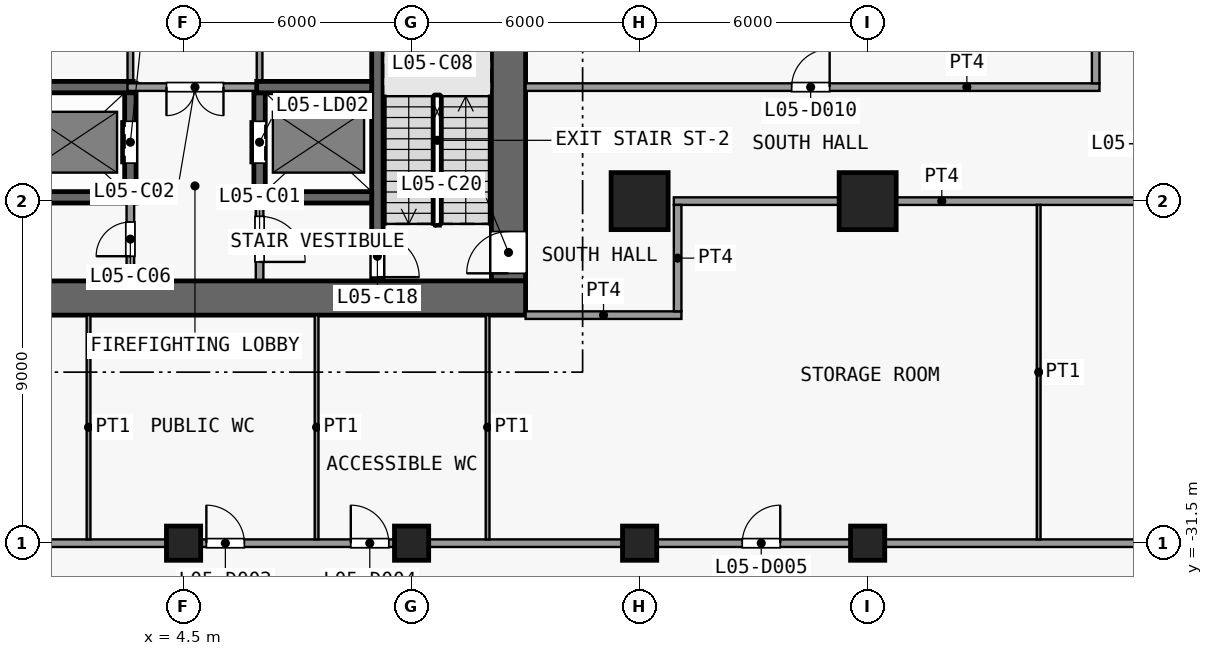
"""IFC4 building model, lengths in metres.
Left out: names, types, materials, properties, quantities, classifications, styles, units other than length and angle.
Written with IfcOpenShell. Run it as: python <this file> out.ifc"""

import sys

from ifc_helpers import new_model, si_unit, direction, frame, frame_2d, origin, origin_2d, place, context, subcontext, project, spatial, rectangle, extrude, element, fill, save


model = new_model("IFC4")
c1 = context("Model", 3, precision=1e-05, world=origin(), true_north=direction((0.0, 1.0)))
c2 = subcontext(c1, "Body", "Model", "MODEL_VIEW")
j1 = project(units=[si_unit("LENGTHUNIT", "METRE"), si_unit("PLANEANGLEUNIT", "RADIAN")], contexts=[c1])
p1 = place(None, origin())
s1 = spatial("IfcSite", under=j1, at=p1, CompositionType="ELEMENT")
p2 = place(p1, origin())
s2 = spatial("IfcBuilding", under=s1, at=p2, CompositionType="ELEMENT")
p3 = place(p2, frame((0.0, 0.0, 28.0)))
s3 = spatial("IfcBuildingStorey", under=s2, at=p3, CompositionType="ELEMENT", Elevation=28.0)
for number, where, z_axis, x_axis in (
    (1, (4.5, -31.5, 0.0), (0.0, 0.0, 1.0), (1.0, 0.0, 0.0)),
    (2, (10.5, -31.5, 0.0), (0.0, 0.0, 1.0), (1.0, 0.0, 0.0)),
    (3, (16.5, -31.5, 0.0), (0.0, 0.0, 1.0), (1.0, 0.0, 0.0)),
):
    element("IfcColumn", number, at=place(p3, frame(where, z_axis=z_axis, x_axis=x_axis)), inside=s3, PredefinedType="COLUMN", context=c2, shape_type="SweptSolid", body=[
        extrude(rectangle(XDim=0.9, YDim=0.9, at=origin_2d()), origin(), (0.0, 0.0, 1.0), 4.5),
    ])
p4 = place(p3, frame((16.5, -22.5, 0.0), z_axis=(0.0, 0.0, 1.0), x_axis=(1.0, 0.0, 0.0)))
e4 = element("IfcColumn", 4, at=p4, inside=s3, PredefinedType="COLUMN", context=c2, shape_type="SweptSolid", body=[
    extrude(rectangle(XDim=1.5, YDim=1.5, at=origin_2d()), origin(), (0.0, 0.0, 1.0), 4.5),
])
p5 = place(p3, frame((22.5, -31.5, 0.0), z_axis=(0.0, 0.0, 1.0), x_axis=(1.0, 0.0, 0.0)))
e5 = element("IfcColumn", 5, at=p5, inside=s3, PredefinedType="COLUMN", context=c2, shape_type="SweptSolid", body=[
    extrude(rectangle(XDim=0.9, YDim=0.9, at=origin_2d()), origin(), (0.0, 0.0, 1.0), 4.5),
])
p6 = place(p3, frame((22.5, -22.5, 0.0), z_axis=(0.0, 0.0, 1.0), x_axis=(1.0, 0.0, 0.0)))
e6 = element("IfcColumn", 6, at=p6, inside=s3, PredefinedType="COLUMN", context=c2, shape_type="SweptSolid", body=[
    extrude(rectangle(XDim=1.5, YDim=1.5, at=origin_2d()), origin(), (0.0, 0.0, 1.0), 4.5),
])
p7 = place(p3, frame((-13.5, -25.05, 0.0), z_axis=(0.0, 0.0, 1.0), x_axis=(1.0, 0.0, 0.0)))
e7 = element("IfcWall", 7, at=p7, inside=s3, PredefinedType="SHEAR", context=c2, shape_type="SweptSolid", body=[
    extrude(rectangle(XDim=27.0, YDim=0.9, at=frame_2d((13.5, 0.0))), origin(), (0.0, 0.0, 1.0), 4.1),
])
p8 = place(p3, frame((13.05, -24.6, 0.0), z_axis=(0.0, 0.0, 1.0), x_axis=(0.0, 1.0, 0.0)))
e8 = element("IfcWall", 8, at=p8, inside=s3, PredefinedType="SHEAR", context=c2, shape_type="SweptSolid", body=[
    extrude(rectangle(XDim=16.1, YDim=0.9, at=frame_2d((8.05, 0.0))), origin(), (0.0, 0.0, 1.0), 4.1),
])
p9 = place(p8, frame((0.2, 0.0, 0.0)))
e9 = element("IfcOpeningElement", 9, at=p9, cuts=e8, PredefinedType="OPENING", context=c2, shape_type="SweptSolid", body=[
    extrude(rectangle(XDim=1.1, YDim=2.1, at=frame_2d((0.55, 1.05))), frame((0.0, 0.46, 0.0), z_axis=(0.0, -1.0, 0.0), x_axis=(1.0, 0.0, 0.0)), (0.0, 0.0, 1.0), 0.92),
])
p10 = place(p3, frame((-2.95, -22.4, 0.0), z_axis=(0.0, 0.0, 1.0), x_axis=(1.0, 0.0, 0.0)))
e10 = element("IfcWall", 10, at=p10, inside=s3, PredefinedType="SHEAR", context=c2, shape_type="SweptSolid", body=[
    extrude(rectangle(XDim=6.2, YDim=0.3, at=frame_2d((3.1, 0.0))), origin(), (0.0, 0.0, 1.0), 4.1),
])
p11 = place(p3, frame((6.35, -22.4, 0.0), z_axis=(0.0, 0.0, 1.0), x_axis=(1.0, 0.0, 0.0)))
e11 = element("IfcWall", 11, at=p11, inside=s3, PredefinedType="SHEAR", context=c2, shape_type="SweptSolid", body=[
    extrude(rectangle(XDim=3.1, YDim=0.3, at=frame_2d((1.55, 0.0))), origin(), (0.0, 0.0, 1.0), 4.1),
])
p12 = place(p3, frame((0.15, -19.5, 0.0), z_axis=(0.0, 0.0, 1.0), x_axis=(1.0, 0.0, 0.0)))
e12 = element("IfcWall", 12, at=p12, inside=s3, PredefinedType="SHEAR", context=c2, shape_type="SweptSolid", body=[
    extrude(rectangle(XDim=3.025, YDim=0.3, at=frame_2d((1.513, 0.0))), origin(), (0.0, 0.0, 1.0), 4.1),
])
p13 = place(p3, frame((6.575, -19.5, 0.0), z_axis=(0.0, 0.0, 1.0), x_axis=(-1.0, 0.0, 0.0)))
e13 = element("IfcWall", 13, at=p13, inside=s3, PredefinedType="PARTITIONING", context=c2, shape_type="SweptSolid", body=[
    extrude(rectangle(XDim=3.55, YDim=0.2, at=frame_2d((1.775, 0.0))), origin(), (0.0, 0.0, 1.0), 4.1),
])
p14 = place(p13, frame((1.025, 0.0, 0.0)))
e14 = element("IfcOpeningElement", 14, at=p14, cuts=e13, PredefinedType="OPENING", context=c2, shape_type="SweptSolid", body=[
    extrude(rectangle(XDim=1.5, YDim=2.1, at=frame_2d((0.75, 1.05))), frame((0.0, 0.11, 0.0), z_axis=(0.0, -1.0, 0.0), x_axis=(1.0, 0.0, 0.0)), (0.0, 0.0, 1.0), 0.22),
])
p15 = place(p3, frame((6.425, -19.5, 0.0), z_axis=(0.0, 0.0, 1.0), x_axis=(1.0, 0.0, 0.0)))
e15 = element("IfcWall", 15, at=p15, inside=s3, PredefinedType="SHEAR", context=c2, shape_type="SweptSolid", body=[
    extrude(rectangle(XDim=3.025, YDim=0.3, at=frame_2d((1.512, 0.0))), origin(), (0.0, 0.0, 1.0), 4.1),
])
p16 = place(p3, frame((3.1, -24.6, 0.0), z_axis=(0.0, 0.0, 1.0), x_axis=(0.0, 1.0, 0.0)))
e16 = element("IfcWall", 16, at=p16, inside=s3, PredefinedType="PARTITIONING", context=c2, shape_type="SweptSolid", body=[
    extrude(rectangle(XDim=2.05, YDim=0.2, at=frame_2d((1.025, 0.0))), origin(), (0.0, 0.0, 1.0), 4.1),
])
p17 = place(p16, frame((0.65, 0.0, 0.0)))
e17 = element("IfcOpeningElement", 17, at=p17, cuts=e16, PredefinedType="OPENING", context=c2, shape_type="SweptSolid", body=[
    extrude(rectangle(XDim=0.9, YDim=2.1, at=frame_2d((0.45, 1.05))), frame((0.0, 0.11, 0.0), z_axis=(0.0, -1.0, 0.0), x_axis=(1.0, 0.0, 0.0)), (0.0, 0.0, 1.0), 0.22),
])
p18 = place(p3, frame((3.1, -22.25, 0.0), z_axis=(0.0, 0.0, 1.0), x_axis=(0.0, 1.0, 0.0)))
e18 = element("IfcWall", 18, at=p18, inside=s3, PredefinedType="SHEAR", context=c2, shape_type="SweptSolid", body=[
    extrude(rectangle(XDim=2.85, YDim=0.3, at=frame_2d((1.425, 0.0))), origin(), (0.0, 0.0, 1.0), 4.1),
])
p19 = place(p18, frame((0.75, 0.0, 0.0)))
e19 = element("IfcOpeningElement", 19, at=p19, cuts=e18, PredefinedType="OPENING", context=c2, shape_type="SweptSolid", body=[
    extrude(rectangle(XDim=1.1, YDim=2.1, at=frame_2d((0.55, 1.05))), frame((0.0, 0.16, 0.0), z_axis=(0.0, -1.0, 0.0), x_axis=(1.0, 0.0, 0.0)), (0.0, 0.0, 1.0), 0.32),
])
p20 = place(p3, frame((3.1, -19.4, 0.0), z_axis=(0.0, 0.0, 1.0), x_axis=(0.0, 1.0, 0.0)))
e20 = element("IfcWall", 20, at=p20, inside=s3, PredefinedType="PARTITIONING", context=c2, shape_type="SweptSolid", body=[
    extrude(rectangle(XDim=10.9, YDim=0.15, at=frame_2d((5.45, 0.0))), origin(), (0.0, 0.0, 1.0), 4.1),
])
p21 = place(p20, frame((4.8, 0.0, 0.0)))
e21 = element("IfcOpeningElement", 21, at=p21, cuts=e20, PredefinedType="OPENING", context=c2, shape_type="SweptSolid", body=[
    extrude(rectangle(XDim=1.2, YDim=2.1, at=frame_2d((0.6, 1.05))), frame((0.0, 0.085, 0.0), z_axis=(0.0, -1.0, 0.0), x_axis=(1.0, 0.0, 0.0)), (0.0, 0.0, 1.0), 0.17),
])
p22 = place(p3, frame((6.5, -22.55, 0.0), z_axis=(0.0, 0.0, 1.0), x_axis=(0.0, -1.0, 0.0)))
e22 = element("IfcWall", 22, at=p22, inside=s3, PredefinedType="PARTITIONING", context=c2, shape_type="SweptSolid", body=[
    extrude(rectangle(XDim=2.05, YDim=0.2, at=frame_2d((1.025, 0.0))), origin(), (0.0, 0.0, 1.0), 4.1),
])
p23 = place(p22, frame((0.35, 0.0, 0.0)))
e23 = element("IfcOpeningElement", 23, at=p23, cuts=e22, PredefinedType="OPENING", context=c2, shape_type="SweptSolid", body=[
    extrude(rectangle(XDim=1.2, YDim=2.1, at=frame_2d((0.6, 1.05))), frame((0.0, 0.11, 0.0), z_axis=(0.0, -1.0, 0.0), x_axis=(1.0, 0.0, 0.0)), (0.0, 0.0, 1.0), 0.22),
])
p24 = place(p3, frame((6.5, -22.25, 0.0), z_axis=(0.0, 0.0, 1.0), x_axis=(0.0, 1.0, 0.0)))
e24 = element("IfcWall", 24, at=p24, inside=s3, PredefinedType="SHEAR", context=c2, shape_type="SweptSolid", body=[
    extrude(rectangle(XDim=2.6, YDim=0.3, at=frame_2d((1.3, 0.0))), origin(), (0.0, 0.0, 1.0), 4.1),
])
p25 = place(p24, frame((0.75, 0.0, 0.0)))
e25 = element("IfcOpeningElement", 25, at=p25, cuts=e24, PredefinedType="OPENING", context=c2, shape_type="SweptSolid", body=[
    extrude(rectangle(XDim=1.1, YDim=2.1, at=frame_2d((0.55, 1.05))), frame((0.0, 0.16, 0.0), z_axis=(0.0, -1.0, 0.0), x_axis=(1.0, 0.0, 0.0)), (0.0, 0.0, 1.0), 0.32),
])
p26 = place(p3, frame((6.5, -8.5, 0.0), z_axis=(0.0, 0.0, 1.0), x_axis=(0.0, -1.0, 0.0)))
e26 = element("IfcWall", 26, at=p26, inside=s3, PredefinedType="PARTITIONING", context=c2, shape_type="SweptSolid", body=[
    extrude(rectangle(XDim=10.85, YDim=0.15, at=frame_2d((5.425, 0.0))), origin(), (0.0, 0.0, 1.0), 4.1),
])
p27 = place(p26, frame((6.275, 0.0, 0.0)))
e27 = element("IfcOpeningElement", 27, at=p27, cuts=e26, PredefinedType="OPENING", context=c2, shape_type="SweptSolid", body=[
    extrude(rectangle(XDim=1.2, YDim=2.1, at=frame_2d((0.6, 1.05))), frame((0.0, 0.085, 0.0), z_axis=(0.0, -1.0, 0.0), x_axis=(1.0, 0.0, 0.0)), (0.0, 0.0, 1.0), 0.17),
])
p28 = place(p26, frame((0.925, 0.0, 0.0)))
e28 = element("IfcOpeningElement", 28, at=p28, cuts=e26, PredefinedType="OPENING", context=c2, shape_type="SweptSolid", body=[
    extrude(rectangle(XDim=0.9, YDim=2.1, at=frame_2d((0.45, 1.05))), frame((0.0, 0.085, 0.0), z_axis=(0.0, -1.0, 0.0), x_axis=(1.0, 0.0, 0.0)), (0.0, 0.0, 1.0), 0.17),
])
p29 = place(p3, frame((9.6, -16.9, 0.0), z_axis=(0.0, 0.0, 1.0), x_axis=(0.0, -1.0, 0.0)))
e29 = element("IfcWall", 29, at=p29, inside=s3, PredefinedType="SHEAR", context=c2, shape_type="SweptSolid", body=[
    extrude(rectangle(XDim=7.7, YDim=0.3, at=frame_2d((3.85, 0.0))), origin(), (0.0, 0.0, 1.0), 4.1),
])
p30 = place(p29, frame((6.5, 0.0, 0.0)))
e30 = element("IfcOpeningElement", 30, at=p30, cuts=e29, PredefinedType="OPENING", context=c2, shape_type="SweptSolid", body=[
    extrude(rectangle(XDim=1.1, YDim=2.1, at=frame_2d((0.55, 1.05))), frame((0.0, 0.16, 0.0), z_axis=(0.0, -1.0, 0.0), x_axis=(1.0, 0.0, 0.0)), (0.0, 0.0, 1.0), 0.32),
])
p31 = place(p3, frame((-25.9, -31.5, 0.0), z_axis=(0.0, 0.0, 1.0), x_axis=(1.0, 0.0, 0.0)))
e31 = element("IfcWall", 31, at=p31, inside=s3, PredefinedType="PARTITIONING", context=c2, shape_type="SweptSolid", body=[
    extrude(rectangle(XDim=78.15, YDim=0.2, at=frame_2d((39.075, 0.0))), origin(), (0.0, 0.0, 1.0), 4.1),
])
p32 = place(p31, frame((5.1, 0.0, 0.0)))
e32 = element("IfcOpeningElement", 32, at=p32, cuts=e31, PredefinedType="OPENING", context=c2, shape_type="SweptSolid", body=[
    extrude(rectangle(XDim=1.0, YDim=2.1, at=frame_2d((0.5, 1.05))), frame((0.0, 0.11, 0.0), z_axis=(0.0, -1.0, 0.0), x_axis=(1.0, 0.0, 0.0)), (0.0, 0.0, 1.0), 0.22),
])
p33 = place(p31, frame((22.0, 0.0, 0.0)))
e33 = element("IfcOpeningElement", 33, at=p33, cuts=e31, PredefinedType="OPENING", context=c2, shape_type="SweptSolid", body=[
    extrude(rectangle(XDim=1.0, YDim=2.1, at=frame_2d((0.5, 1.05))), frame((0.0, 0.11, 0.0), z_axis=(0.0, -1.0, 0.0), x_axis=(1.0, 0.0, 0.0)), (0.0, 0.0, 1.0), 0.22),
])
p34 = place(p31, frame((31.0, 0.0, 0.0)))
e34 = element("IfcOpeningElement", 34, at=p34, cuts=e31, PredefinedType="OPENING", context=c2, shape_type="SweptSolid", body=[
    extrude(rectangle(XDim=1.0, YDim=2.1, at=frame_2d((0.5, 1.05))), frame((0.0, 0.11, 0.0), z_axis=(0.0, -1.0, 0.0), x_axis=(1.0, 0.0, 0.0)), (0.0, 0.0, 1.0), 0.22),
])
p35 = place(p31, frame((34.8, 0.0, 0.0)))
e35 = element("IfcOpeningElement", 35, at=p35, cuts=e31, PredefinedType="OPENING", context=c2, shape_type="SweptSolid", body=[
    extrude(rectangle(XDim=1.0, YDim=2.1, at=frame_2d((0.5, 1.05))), frame((0.0, 0.11, 0.0), z_axis=(0.0, -1.0, 0.0), x_axis=(1.0, 0.0, 0.0)), (0.0, 0.0, 1.0), 0.22),
])
p36 = place(p31, frame((45.1, 0.0, 0.0)))
e36 = element("IfcOpeningElement", 36, at=p36, cuts=e31, PredefinedType="OPENING", context=c2, shape_type="SweptSolid", body=[
    extrude(rectangle(XDim=1.0, YDim=2.1, at=frame_2d((0.5, 1.05))), frame((0.0, 0.11, 0.0), z_axis=(0.0, -1.0, 0.0), x_axis=(1.0, 0.0, 0.0)), (0.0, 0.0, 1.0), 0.22),
])
p37 = place(p31, frame((58.0, 0.0, 0.0)))
e37 = element("IfcOpeningElement", 37, at=p37, cuts=e31, PredefinedType="OPENING", context=c2, shape_type="SweptSolid", body=[
    extrude(rectangle(XDim=1.8, YDim=2.1, at=frame_2d((0.9, 1.05))), frame((0.0, 0.11, 0.0), z_axis=(0.0, -1.0, 0.0), x_axis=(1.0, 0.0, 0.0)), (0.0, 0.0, 1.0), 0.22),
])
p38 = place(p31, frame((72.2, 0.0, 0.0)))
e38 = element("IfcOpeningElement", 38, at=p38, cuts=e31, PredefinedType="OPENING", context=c2, shape_type="SweptSolid", body=[
    extrude(rectangle(XDim=1.8, YDim=2.1, at=frame_2d((0.9, 1.05))), frame((0.0, 0.11, 0.0), z_axis=(0.0, -1.0, 0.0), x_axis=(1.0, 0.0, 0.0)), (0.0, 0.0, 1.0), 0.22),
])
p39 = place(p3, frame((13.5, -25.5, 0.0), z_axis=(0.0, 0.0, 1.0), x_axis=(1.0, 0.0, 0.0)))
e39 = element("IfcWall", 39, at=p39, inside=s3, PredefinedType="PARTITIONING", context=c2, shape_type="SweptSolid", body=[
    extrude(rectangle(XDim=4.1, YDim=0.2, at=frame_2d((2.05, 0.0))), origin(), (0.0, 0.0, 1.0), 4.1),
])
p40 = place(p3, frame((17.4, -22.5, 0.0), z_axis=(0.0, 0.0, 1.0), x_axis=(1.0, 0.0, 0.0)))
e40 = element("IfcWall", 40, at=p40, inside=s3, PredefinedType="PARTITIONING", context=c2, shape_type="SweptSolid", body=[
    extrude(rectangle(XDim=14.1, YDim=0.2, at=frame_2d((7.05, 0.0))), origin(), (0.0, 0.0, 1.0), 4.1),
])
p41 = place(p3, frame((13.5, -19.5, 0.0), z_axis=(0.0, 0.0, 1.0), x_axis=(1.0, 0.0, 0.0)))
e41 = element("IfcWall", 41, at=p41, inside=s3, PredefinedType="PARTITIONING", context=c2, shape_type="SweptSolid", body=[
    extrude(rectangle(XDim=15.1, YDim=0.2, at=frame_2d((7.55, 0.0))), origin(), (0.0, 0.0, 1.0), 4.1),
])
p42 = place(p41, frame((7.0, 0.0, 0.0)))
e42 = element("IfcOpeningElement", 42, at=p42, cuts=e41, PredefinedType="OPENING", context=c2, shape_type="SweptSolid", body=[
    extrude(rectangle(XDim=1.0, YDim=2.1, at=frame_2d((0.5, 1.05))), frame((0.0, 0.11, 0.0), z_axis=(0.0, -1.0, 0.0), x_axis=(1.0, 0.0, 0.0)), (0.0, 0.0, 1.0), 0.22),
])
for number, where, z_axis, x_axis in (
    (43, (2.0, -31.4, 0.0), (0.0, 0.0, 1.0), (0.0, 1.0, 0.0)),
    (44, (8.0, -31.4, 0.0), (0.0, 0.0, 1.0), (0.0, 1.0, 0.0)),
    (45, (12.5, -31.4, 0.0), (0.0, 0.0, 1.0), (0.0, 1.0, 0.0)),
):
    element("IfcWall", number, at=place(p3, frame(where, z_axis=z_axis, x_axis=x_axis)), inside=s3, PredefinedType="PARTITIONING", context=c2, shape_type="SweptSolid", body=[
        extrude(rectangle(XDim=5.9, YDim=0.1, at=frame_2d((2.95, 0.0))), origin(), (0.0, 0.0, 1.0), 4.1),
    ])
p43 = place(p3, frame((17.5, -25.4, 0.0), z_axis=(0.0, 0.0, 1.0), x_axis=(0.0, 1.0, 0.0)))
e46 = element("IfcWall", 46, at=p43, inside=s3, PredefinedType="PARTITIONING", context=c2, shape_type="SweptSolid", body=[
    extrude(rectangle(XDim=2.8, YDim=0.2, at=frame_2d((1.4, 0.0))), origin(), (0.0, 0.0, 1.0), 4.1),
])
p44 = place(p3, frame((27.0, -31.4, 0.0), z_axis=(0.0, 0.0, 1.0), x_axis=(0.0, 1.0, 0.0)))
e47 = element("IfcWall", 47, at=p44, inside=s3, PredefinedType="PARTITIONING", context=c2, shape_type="SweptSolid", body=[
    extrude(rectangle(XDim=8.8, YDim=0.1, at=frame_2d((4.4, 0.0))), origin(), (0.0, 0.0, 1.0), 4.1),
])
p45 = place(p3, frame((28.5, -19.4, 0.0), z_axis=(0.0, 0.0, 1.0), x_axis=(0.0, 1.0, 0.0)))
e48 = element("IfcWall", 48, at=p45, inside=s3, PredefinedType="PARTITIONING", context=c2, shape_type="SweptSolid", body=[
    extrude(rectangle(XDim=14.8, YDim=0.2, at=frame_2d((7.4, 0.0))), origin(), (0.0, 0.0, 1.0), 4.1),
])
p46 = place(p19, origin())
e49 = element("IfcDoor", 49, at=p46, inside=s3, OperationType="DOUBLE_DOOR_SLIDING", PredefinedType="DOOR", context=c2, shape_type="SweptSolid", body=[
    extrude(rectangle(XDim=1.1, YDim=2.1, at=frame_2d((0.55, 1.05))), frame((0.0, 0.025, 0.0), z_axis=(0.0, -1.0, 0.0), x_axis=(1.0, 0.0, 0.0)), (0.0, 0.0, 1.0), 0.05),
])
fill(e19, e49)
p47 = place(p25, origin())
e50 = element("IfcDoor", 50, at=p47, inside=s3, OperationType="DOUBLE_DOOR_SLIDING", PredefinedType="DOOR", context=c2, shape_type="SweptSolid", body=[
    extrude(rectangle(XDim=1.1, YDim=2.1, at=frame_2d((0.55, 1.05))), frame((0.0, 0.025, 0.0), z_axis=(0.0, -1.0, 0.0), x_axis=(1.0, 0.0, 0.0)), (0.0, 0.0, 1.0), 0.05),
])
fill(e25, e50)
p48 = place(p23, origin())
e51 = element("IfcDoor", 51, at=p48, inside=s3, OperationType="SINGLE_SWING_RIGHT", PredefinedType="DOOR", context=c2, shape_type="SweptSolid", body=[
    extrude(rectangle(XDim=1.2, YDim=2.1, at=frame_2d((0.6, 1.05))), frame((0.0, 0.025, 0.0), z_axis=(0.0, -1.0, 0.0), x_axis=(1.0, 0.0, 0.0)), (0.0, 0.0, 1.0), 0.05),
])
fill(e23, e51)
p49 = place(p14, origin())
e52 = element("IfcDoor", 52, at=p49, inside=s3, OperationType="DOUBLE_DOOR_SINGLE_SWING", PredefinedType="DOOR", context=c2, shape_type="SweptSolid", body=[
    extrude(rectangle(XDim=1.5, YDim=2.1, at=frame_2d((0.75, 1.05))), frame((0.0, 0.025, 0.0), z_axis=(0.0, -1.0, 0.0), x_axis=(1.0, 0.0, 0.0)), (0.0, 0.0, 1.0), 0.05),
])
fill(e14, e52)
p50 = place(p17, origin())
e53 = element("IfcDoor", 53, at=p50, inside=s3, OperationType="SINGLE_SWING_LEFT", PredefinedType="DOOR", context=c2, shape_type="SweptSolid", body=[
    extrude(rectangle(XDim=0.9, YDim=2.1, at=frame_2d((0.45, 1.05))), frame((0.0, 0.025, 0.0), z_axis=(0.0, -1.0, 0.0), x_axis=(1.0, 0.0, 0.0)), (0.0, 0.0, 1.0), 0.05),
])
fill(e17, e53)
p51 = place(p30, origin())
e54 = element("IfcDoor", 54, at=p51, inside=s3, OperationType="SINGLE_SWING_RIGHT", PredefinedType="DOOR", context=c2, shape_type="SweptSolid", body=[
    extrude(rectangle(XDim=1.1, YDim=2.1, at=frame_2d((0.55, 1.05))), frame((0.0, 0.025, 0.0), z_axis=(0.0, -1.0, 0.0), x_axis=(1.0, 0.0, 0.0)), (0.0, 0.0, 1.0), 0.05),
])
fill(e30, e54)
p52 = place(p9, origin())
e55 = element("IfcDoor", 55, at=p52, inside=s3, OperationType="SINGLE_SWING_LEFT", PredefinedType="DOOR", context=c2, shape_type="SweptSolid", body=[
    extrude(rectangle(XDim=1.1, YDim=2.1, at=frame_2d((0.55, 1.05))), frame((0.0, 0.025, 0.0), z_axis=(0.0, -1.0, 0.0), x_axis=(1.0, 0.0, 0.0)), (0.0, 0.0, 1.0), 0.05),
])
fill(e9, e55)
p53 = place(p34, origin())
e56 = element("IfcDoor", 56, at=p53, inside=s3, OperationType="SINGLE_SWING_RIGHT", PredefinedType="DOOR", context=c2, shape_type="SweptSolid", body=[
    extrude(rectangle(XDim=1.0, YDim=2.1, at=frame_2d((0.5, 1.05))), frame((0.0, 0.025, 0.0), z_axis=(0.0, -1.0, 0.0), x_axis=(1.0, 0.0, 0.0)), (0.0, 0.0, 1.0), 0.05),
])
fill(e34, e56)
p54 = place(p35, origin())
e57 = element("IfcDoor", 57, at=p54, inside=s3, OperationType="SINGLE_SWING_RIGHT", PredefinedType="DOOR", context=c2, shape_type="SweptSolid", body=[
    extrude(rectangle(XDim=1.0, YDim=2.1, at=frame_2d((0.5, 1.05))), frame((0.0, 0.025, 0.0), z_axis=(0.0, -1.0, 0.0), x_axis=(1.0, 0.0, 0.0)), (0.0, 0.0, 1.0), 0.05),
])
fill(e35, e57)
p55 = place(p36, origin())
e58 = element("IfcDoor", 58, at=p55, inside=s3, OperationType="SINGLE_SWING_LEFT", PredefinedType="DOOR", context=c2, shape_type="SweptSolid", body=[
    extrude(rectangle(XDim=1.0, YDim=2.1, at=frame_2d((0.5, 1.05))), frame((0.0, 0.025, 0.0), z_axis=(0.0, -1.0, 0.0), x_axis=(1.0, 0.0, 0.0)), (0.0, 0.0, 1.0), 0.05),
])
fill(e36, e58)
p56 = place(p42, origin())
e59 = element("IfcDoor", 59, at=p56, inside=s3, OperationType="SINGLE_SWING_LEFT", PredefinedType="DOOR", context=c2, shape_type="SweptSolid", body=[
    extrude(rectangle(XDim=1.0, YDim=2.1, at=frame_2d((0.5, 1.05))), frame((0.0, 0.025, 0.0), z_axis=(0.0, -1.0, 0.0), x_axis=(1.0, 0.0, 0.0)), (0.0, 0.0, 1.0), 0.05),
])
fill(e42, e59)
save(model, sys.argv[1])
